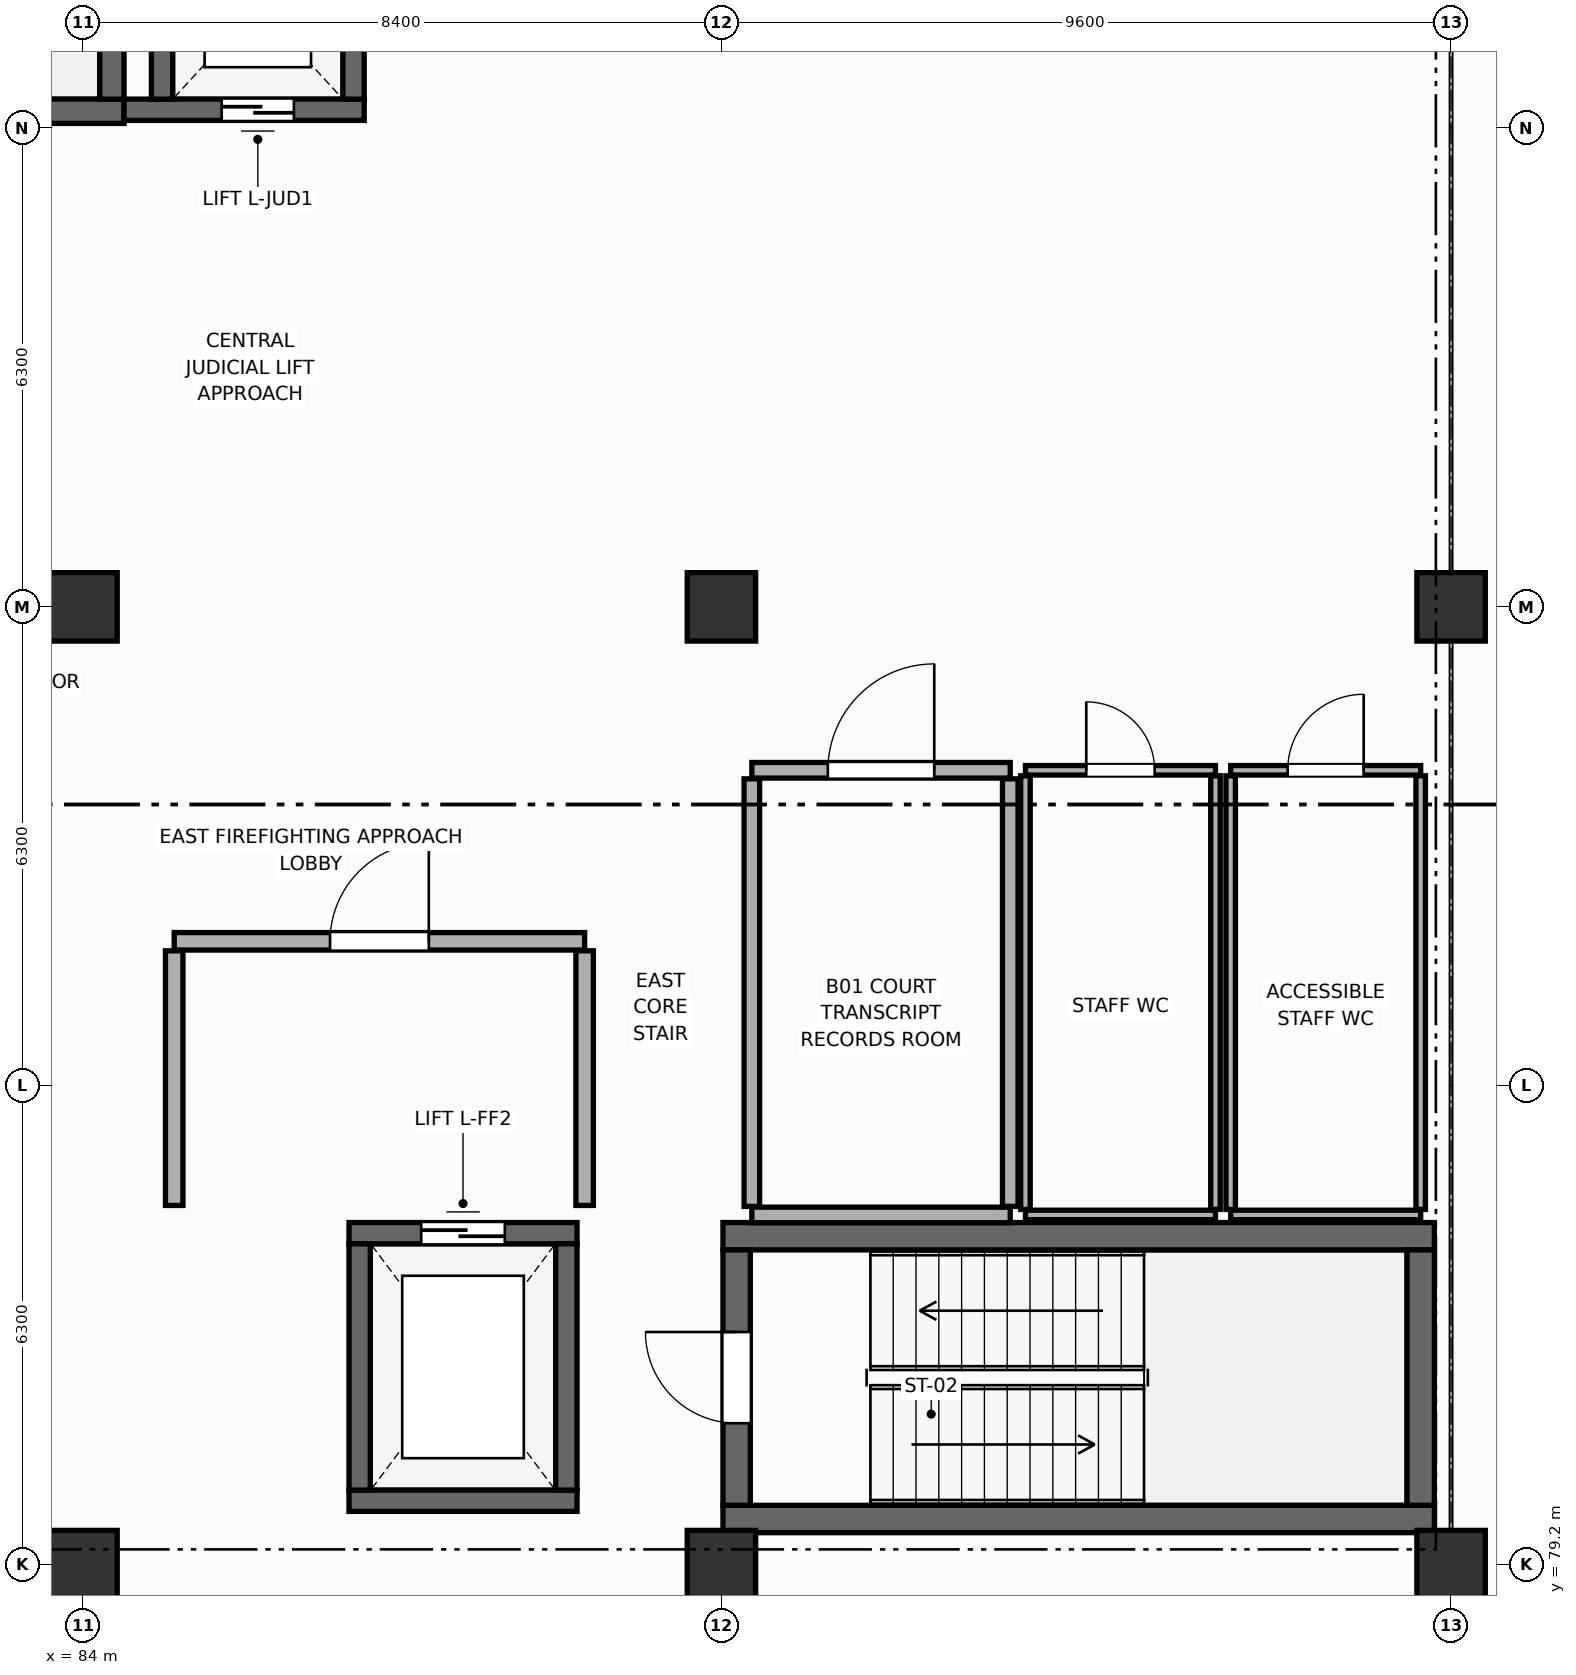
"""IFC4 building model, lengths in metres.
Left out: names, types, materials, properties, quantities, classifications, styles, units other than length and angle.
Written with IfcOpenShell. Run it as: python <this file> out.ifc"""

import sys

from ifc_helpers import new_model, si_unit, direction, frame, frame_2d, origin, origin_2d, place, context, subcontext, project, spatial, rectangle, extrude, element, fill, save


model = new_model("IFC4")
c1 = context("Model", 3, precision=1e-05, world=origin(), true_north=direction((0.0, 1.0)))
c2 = subcontext(c1, "Body", "Model", "MODEL_VIEW")
j1 = project(units=[si_unit("LENGTHUNIT", "METRE"), si_unit("PLANEANGLEUNIT", "RADIAN")], contexts=[c1])
p1 = place(None, origin())
s1 = spatial("IfcSite", under=j1, at=p1, CompositionType="ELEMENT")
p2 = place(p1, origin())
s2 = spatial("IfcBuilding", under=s1, at=p2, CompositionType="ELEMENT")
p3 = place(p2, frame((0.0, 0.0, -4.8)))
s3 = spatial("IfcBuildingStorey", under=s2, at=p3, CompositionType="ELEMENT", Elevation=-4.8)
for number, where, z_axis, x_axis in (
    (1, (84.0, 79.2, -0.42), (0.0, 0.0, 1.0), (1.0, 0.0, 0.0)),
    (2, (84.0, 91.8, -0.42), (0.0, 0.0, 1.0), (1.0, 0.0, 0.0)),
    (3, (92.4, 79.2, -0.42), (0.0, 0.0, 1.0), (1.0, 0.0, 0.0)),
    (4, (92.4, 91.8, -0.42), (0.0, 0.0, 1.0), (1.0, 0.0, 0.0)),
    (5, (102.0, 79.2, -0.42), (0.0, 0.0, 1.0), (1.0, 0.0, 0.0)),
    (6, (102.0, 91.8, -0.42), (0.0, 0.0, 1.0), (1.0, 0.0, 0.0)),
):
    element("IfcColumn", number, at=place(p3, frame(where, z_axis=z_axis, x_axis=x_axis)), inside=s3, PredefinedType="COLUMN", context=c2, shape_type="SweptSolid", body=[
        extrude(rectangle(XDim=0.9, YDim=0.9, at=origin_2d()), origin(), (0.0, 0.0, 1.0), 5.22),
    ])
for number, where, z_axis, x_axis in (
    (7, (92.42, 83.52, -0.42), (0.0, 0.0, 1.0), (1.0, 0.0, 0.0)),
    (8, (101.78, 79.8, -0.42), (0.0, 0.0, 1.0), (-1.0, 0.0, 0.0)),
):
    element("IfcWall", number, at=place(p3, frame(where, z_axis=z_axis, x_axis=x_axis)), inside=s3, PredefinedType="SHEAR", context=c2, shape_type="SweptSolid", body=[
        extrude(rectangle(XDim=9.36, YDim=0.36, at=frame_2d((4.68, 0.0))), origin(), (0.0, 0.0, 1.0), 4.94),
    ])
p4 = place(p3, frame((92.6, 79.98, -0.42), z_axis=(0.0, 0.0, 1.0), x_axis=(0.0, 1.0, 0.0)))
e9 = element("IfcWall", 9, at=p4, inside=s3, PredefinedType="SHEAR", context=c2, shape_type="SweptSolid", body=[
    extrude(rectangle(XDim=3.36, YDim=0.36, at=frame_2d((1.68, 0.0))), origin(), (0.0, 0.0, 1.0), 4.94),
])
p5 = place(p4, frame((1.08, 0.0, 0.42)))
e10 = element("IfcOpeningElement", 10, at=p5, cuts=e9, PredefinedType="OPENING", context=c2, shape_type="SweptSolid", body=[
    extrude(rectangle(XDim=1.2, YDim=2.2, at=frame_2d((0.6, 1.1))), frame((0.0, 0.19, 0.0), z_axis=(0.0, -1.0, 0.0), x_axis=(1.0, 0.0, 0.0)), (0.0, 0.0, 1.0), 0.38),
])
p6 = place(p3, frame((101.6, 83.34, -0.42), z_axis=(0.0, 0.0, 1.0), x_axis=(0.0, -1.0, 0.0)))
e11 = element("IfcWall", 11, at=p6, inside=s3, PredefinedType="SHEAR", context=c2, shape_type="SweptSolid", body=[
    extrude(rectangle(XDim=3.36, YDim=0.36, at=frame_2d((1.68, 0.0))), origin(), (0.0, 0.0, 1.0), 4.94),
])
p7 = place(p3, frame((84.54, 98.32, -0.42), z_axis=(0.0, 0.0, 1.0), x_axis=(-1.0, 0.0, 0.0)))
e12 = element("IfcWall", 12, at=p7, inside=s3, PredefinedType="SHEAR", context=c2, shape_type="SweptSolid", body=[
    extrude(rectangle(XDim=9.08, YDim=0.32, at=frame_2d((4.54, 0.0))), origin(), (0.0, 0.0, 1.0), 4.94),
])
p8 = place(p3, frame((84.38, 101.76, -0.42), z_axis=(0.0, 0.0, 1.0), x_axis=(0.0, -1.0, 0.0)))
e13 = element("IfcWall", 13, at=p8, inside=s3, PredefinedType="SHEAR", context=c2, shape_type="SweptSolid", body=[
    extrude(rectangle(XDim=3.28, YDim=0.32, at=frame_2d((1.64, 0.0))), origin(), (0.0, 0.0, 1.0), 4.94),
])
p9 = place(p3, frame((87.5, 83.56, -0.42), z_axis=(0.0, 0.0, 1.0), x_axis=(1.0, 0.0, 0.0)))
e14 = element("IfcWall", 14, at=p9, inside=s3, PredefinedType="SHEAR", context=c2, shape_type="SweptSolid", body=[
    extrude(rectangle(XDim=3.0, YDim=0.28, at=frame_2d((1.5, 0.0))), origin(), (0.0, 0.0, 1.0), 4.94),
])
p10 = place(p9, frame((0.95, 0.0, 0.42)))
e15 = element("IfcOpeningElement", 15, at=p10, cuts=e14, PredefinedType="OPENING", context=c2, shape_type="SweptSolid", body=[
    extrude(rectangle(XDim=1.1, YDim=2.2, at=frame_2d((0.55, 1.1))), frame((0.0, 0.15, 0.0), z_axis=(0.0, -1.0, 0.0), x_axis=(1.0, 0.0, 0.0)), (0.0, 0.0, 1.0), 0.3),
])
p11 = place(p3, frame((90.5, 80.04, -0.42), z_axis=(0.0, 0.0, 1.0), x_axis=(-1.0, 0.0, 0.0)))
e16 = element("IfcWall", 16, at=p11, inside=s3, PredefinedType="SHEAR", context=c2, shape_type="SweptSolid", body=[
    extrude(rectangle(XDim=3.0, YDim=0.28, at=frame_2d((1.5, 0.0))), origin(), (0.0, 0.0, 1.0), 4.94),
])
for number, where, z_axis, x_axis in (
    (17, (87.64, 80.18, -0.42), (0.0, 0.0, 1.0), (0.0, 1.0, 0.0)),
    (18, (90.36, 83.42, -0.42), (0.0, 0.0, 1.0), (0.0, -1.0, 0.0)),
):
    element("IfcWall", number, at=place(p3, frame(where, z_axis=z_axis, x_axis=x_axis)), inside=s3, PredefinedType="SHEAR", context=c2, shape_type="SweptSolid", body=[
        extrude(rectangle(XDim=3.24, YDim=0.28, at=frame_2d((1.62, 0.0))), origin(), (0.0, 0.0, 1.0), 4.94),
    ])
p12 = place(p3, frame((87.7, 98.34, -0.42), z_axis=(0.0, 0.0, 1.0), x_axis=(-1.0, 0.0, 0.0)))
e19 = element("IfcWall", 19, at=p12, inside=s3, PredefinedType="SHEAR", context=c2, shape_type="SweptSolid", body=[
    extrude(rectangle(XDim=3.16, YDim=0.28, at=frame_2d((1.58, 0.0))), origin(), (0.0, 0.0, 1.0), 4.94),
])
p13 = place(p12, frame((0.925, 0.0, 0.42)))
e20 = element("IfcOpeningElement", 20, at=p13, cuts=e19, PredefinedType="OPENING", context=c2, shape_type="SweptSolid", body=[
    extrude(rectangle(XDim=0.95, YDim=2.15, at=frame_2d((0.475, 1.075))), frame((0.0, 0.15, 0.0), z_axis=(0.0, -1.0, 0.0), x_axis=(1.0, 0.0, 0.0)), (0.0, 0.0, 1.0), 0.3),
])
for number, where, z_axis, x_axis in (
    (21, (85.04, 98.48, -0.42), (0.0, 0.0, 1.0), (0.0, 1.0, 0.0)),
    (22, (87.56, 100.92, -0.42), (0.0, 0.0, 1.0), (0.0, -1.0, 0.0)),
):
    element("IfcWall", number, at=place(p3, frame(where, z_axis=z_axis, x_axis=x_axis)), inside=s3, PredefinedType="SHEAR", context=c2, shape_type="SweptSolid", body=[
        extrude(rectangle(XDim=2.44, YDim=0.28, at=frame_2d((1.22, 0.0))), origin(), (0.0, 0.0, 1.0), 4.94),
    ])
p14 = place(p3, frame((85.2, 87.4, 0.0), z_axis=(0.0, 0.0, 1.0), x_axis=(1.0, 0.0, 0.0)))
e23 = element("IfcWall", 23, at=p14, inside=s3, PredefinedType="STANDARD", context=c2, shape_type="SweptSolid", body=[
    extrude(rectangle(XDim=5.4, YDim=0.23, at=frame_2d((2.7, 0.0))), origin(), (0.0, 0.0, 1.0), 3.9),
])
p15 = place(p14, frame((2.05, 0.0, 0.0)))
e24 = element("IfcOpeningElement", 24, at=p15, cuts=e23, PredefinedType="OPENING", context=c2, shape_type="SweptSolid", body=[
    extrude(rectangle(XDim=1.3, YDim=2.2, at=frame_2d((0.65, 1.1))), frame((0.0, 0.125, 0.0), z_axis=(0.0, -1.0, 0.0), x_axis=(1.0, 0.0, 0.0)), (0.0, 0.0, 1.0), 0.25),
])
for number, where, z_axis, x_axis in (
    (25, (85.2, 83.925, 0.0), (0.0, 0.0, 1.0), (0.0, 1.0, 0.0)),
    (26, (90.6, 87.275, 0.0), (0.0, 0.0, 1.0), (0.0, -1.0, 0.0)),
):
    element("IfcWall", number, at=place(p3, frame(where, z_axis=z_axis, x_axis=x_axis)), inside=s3, PredefinedType="STANDARD", context=c2, shape_type="SweptSolid", body=[
        extrude(rectangle(XDim=3.35, YDim=0.23, at=frame_2d((1.675, 0.0))), origin(), (0.0, 0.0, 1.0), 3.9),
    ])
p16 = place(p3, frame((96.4, 89.65, 0.0), z_axis=(0.0, 0.0, 1.0), x_axis=(1.0, 0.0, 0.0)))
e27 = element("IfcWall", 27, at=p16, inside=s3, PredefinedType="PARTITIONING", context=c2, shape_type="SweptSolid", body=[
    extrude(rectangle(XDim=2.5, YDim=0.125, at=frame_2d((1.25, 0.0))), origin(), (0.0, 0.0, 1.0), 4.505),
])
p17 = place(p16, frame((0.8, 0.0, 0.0)))
e28 = element("IfcOpeningElement", 28, at=p17, cuts=e27, PredefinedType="OPENING", context=c2, shape_type="SweptSolid", body=[
    extrude(rectangle(XDim=0.9, YDim=2.1, at=frame_2d((0.45, 1.05))), frame((0.0, 0.073, 0.0), z_axis=(0.0, -1.0, 0.0), x_axis=(1.0, 0.0, 0.0)), (0.0, 0.0, 1.0), 0.145),
])
p18 = place(p3, frame((98.9, 83.8, 0.0), z_axis=(0.0, 0.0, 1.0), x_axis=(-1.0, 0.0, 0.0)))
e29 = element("IfcWall", 29, at=p18, inside=s3, PredefinedType="PARTITIONING", context=c2, shape_type="SweptSolid", body=[
    extrude(rectangle(XDim=2.5, YDim=0.125, at=frame_2d((1.25, 0.0))), origin(), (0.0, 0.0, 1.0), 4.505),
])
for number, where, z_axis, x_axis in (
    (30, (96.4, 83.873, 0.0), (0.0, 0.0, 1.0), (0.0, 1.0, 0.0)),
    (31, (98.9, 89.577, 0.0), (0.0, 0.0, 1.0), (0.0, -1.0, 0.0)),
):
    element("IfcWall", number, at=place(p3, frame(where, z_axis=z_axis, x_axis=x_axis)), inside=s3, PredefinedType="PARTITIONING", context=c2, shape_type="SweptSolid", body=[
        extrude(rectangle(XDim=5.705, YDim=0.125, at=frame_2d((2.853, 0.0))), origin(), (0.0, 0.0, 1.0), 3.9),
    ])
p19 = place(p3, frame((99.1, 89.65, 0.0), z_axis=(0.0, 0.0, 1.0), x_axis=(1.0, 0.0, 0.0)))
e32 = element("IfcWall", 32, at=p19, inside=s3, PredefinedType="PARTITIONING", context=c2, shape_type="SweptSolid", body=[
    extrude(rectangle(XDim=2.5, YDim=0.125, at=frame_2d((1.25, 0.0))), origin(), (0.0, 0.0, 1.0), 3.65),
])
p20 = place(p19, frame((0.75, 0.0, 0.0)))
e33 = element("IfcOpeningElement", 33, at=p20, cuts=e32, PredefinedType="OPENING", context=c2, shape_type="SweptSolid", body=[
    extrude(rectangle(XDim=1.0, YDim=2.1, at=frame_2d((0.5, 1.05))), frame((0.0, 0.073, 0.0), z_axis=(0.0, -1.0, 0.0), x_axis=(1.0, 0.0, 0.0)), (0.0, 0.0, 1.0), 0.145),
])
p21 = place(p3, frame((101.6, 83.8, 0.0), z_axis=(0.0, 0.0, 1.0), x_axis=(-1.0, 0.0, 0.0)))
e34 = element("IfcWall", 34, at=p21, inside=s3, PredefinedType="PARTITIONING", context=c2, shape_type="SweptSolid", body=[
    extrude(rectangle(XDim=2.5, YDim=0.125, at=frame_2d((1.25, 0.0))), origin(), (0.0, 0.0, 1.0), 3.65),
])
p22 = place(p3, frame((99.1, 83.873, 0.0), z_axis=(0.0, 0.0, 1.0), x_axis=(0.0, 1.0, 0.0)))
e35 = element("IfcWall", 35, at=p22, inside=s3, PredefinedType="PARTITIONING", context=c2, shape_type="SweptSolid", body=[
    extrude(rectangle(XDim=5.705, YDim=0.125, at=frame_2d((2.853, 0.0))), origin(), (0.0, 0.0, 1.0), 3.9),
])
p23 = place(p3, frame((101.6, 89.577, 0.0), z_axis=(0.0, 0.0, 1.0), x_axis=(0.0, -1.0, 0.0)))
e36 = element("IfcWall", 36, at=p23, inside=s3, PredefinedType="PARTITIONING", context=c2, shape_type="SweptSolid", body=[
    extrude(rectangle(XDim=5.705, YDim=0.125, at=frame_2d((2.853, 0.0))), origin(), (0.0, 0.0, 1.0), 3.65),
])
p24 = place(p3, frame((92.8, 89.65, 0.0), z_axis=(0.0, 0.0, 1.0), x_axis=(1.0, 0.0, 0.0)))
e37 = element("IfcWall", 37, at=p24, inside=s3, PredefinedType="STANDARD", context=c2, shape_type="SweptSolid", body=[
    extrude(rectangle(XDim=3.4, YDim=0.205, at=frame_2d((1.7, 0.0))), origin(), (0.0, 0.0, 1.0), 3.65),
])
p25 = place(p24, frame((1.0, 0.0, 0.0)))
e38 = element("IfcOpeningElement", 38, at=p25, cuts=e37, PredefinedType="OPENING", context=c2, shape_type="SweptSolid", body=[
    extrude(rectangle(XDim=1.4, YDim=2.25, at=frame_2d((0.7, 1.125))), frame((0.0, 0.113, 0.0), z_axis=(0.0, -1.0, 0.0), x_axis=(1.0, 0.0, 0.0)), (0.0, 0.0, 1.0), 0.225),
])
p26 = place(p3, frame((96.2, 83.8, 0.0), z_axis=(0.0, 0.0, 1.0), x_axis=(-1.0, 0.0, 0.0)))
e39 = element("IfcWall", 39, at=p26, inside=s3, PredefinedType="STANDARD", context=c2, shape_type="SweptSolid", body=[
    extrude(rectangle(XDim=3.4, YDim=0.205, at=frame_2d((1.7, 0.0))), origin(), (0.0, 0.0, 1.0), 3.65),
])
p27 = place(p3, frame((92.8, 83.913, 0.0), z_axis=(0.0, 0.0, 1.0), x_axis=(0.0, 1.0, 0.0)))
e40 = element("IfcWall", 40, at=p27, inside=s3, PredefinedType="STANDARD", context=c2, shape_type="SweptSolid", body=[
    extrude(rectangle(XDim=5.625, YDim=0.205, at=frame_2d((2.812, 0.0))), origin(), (0.0, 0.0, 1.0), 3.65),
])
p28 = place(p3, frame((96.2, 89.538, 0.0), z_axis=(0.0, 0.0, 1.0), x_axis=(0.0, -1.0, 0.0)))
e41 = element("IfcWall", 41, at=p28, inside=s3, PredefinedType="STANDARD", context=c2, shape_type="SweptSolid", body=[
    extrude(rectangle(XDim=5.625, YDim=0.205, at=frame_2d((2.812, 0.0))), origin(), (0.0, 0.0, 1.0), 3.9),
])
p29 = place(p5, origin())
e42 = element("IfcDoor", 42, at=p29, inside=s3, OperationType="SINGLE_SWING_RIGHT", PredefinedType="DOOR", context=c2, shape_type="SweptSolid", body=[
    extrude(rectangle(XDim=1.2, YDim=2.2, at=frame_2d((0.6, 1.1))), frame((0.0, 0.025, 0.0), z_axis=(0.0, -1.0, 0.0), x_axis=(1.0, 0.0, 0.0)), (0.0, 0.0, 1.0), 0.05),
])
fill(e10, e42)
p30 = place(p10, origin())
e43 = element("IfcDoor", 43, at=p30, inside=s3, OperationType="DOUBLE_DOOR_SLIDING", PredefinedType="DOOR", context=c2, shape_type="SweptSolid", body=[
    extrude(rectangle(XDim=1.1, YDim=2.2, at=frame_2d((0.55, 1.1))), frame((0.0, 0.025, 0.0), z_axis=(0.0, -1.0, 0.0), x_axis=(1.0, 0.0, 0.0)), (0.0, 0.0, 1.0), 0.05),
])
fill(e15, e43)
p31 = place(p13, origin())
e44 = element("IfcDoor", 44, at=p31, inside=s3, OperationType="DOUBLE_DOOR_SLIDING", PredefinedType="DOOR", context=c2, shape_type="SweptSolid", body=[
    extrude(rectangle(XDim=0.95, YDim=2.15, at=frame_2d((0.475, 1.075))), frame((0.0, 0.025, 0.0), z_axis=(0.0, -1.0, 0.0), x_axis=(1.0, 0.0, 0.0)), (0.0, 0.0, 1.0), 0.05),
])
fill(e20, e44)
p32 = place(p15, origin())
e45 = element("IfcDoor", 45, at=p32, inside=s3, OperationType="SINGLE_SWING_RIGHT", PredefinedType="DOOR", context=c2, shape_type="SweptSolid", body=[
    extrude(rectangle(XDim=1.3, YDim=2.2, at=frame_2d((0.65, 1.1))), frame((0.0, 0.025, 0.0), z_axis=(0.0, -1.0, 0.0), x_axis=(1.0, 0.0, 0.0)), (0.0, 0.0, 1.0), 0.05),
])
fill(e24, e45)
p33 = place(p17, origin())
e46 = element("IfcDoor", 46, at=p33, inside=s3, OperationType="SINGLE_SWING_LEFT", PredefinedType="DOOR", context=c2, shape_type="SweptSolid", body=[
    extrude(rectangle(XDim=0.9, YDim=2.1, at=frame_2d((0.45, 1.05))), frame((0.0, 0.025, 0.0), z_axis=(0.0, -1.0, 0.0), x_axis=(1.0, 0.0, 0.0)), (0.0, 0.0, 1.0), 0.05),
])
fill(e28, e46)
p34 = place(p20, origin())
e47 = element("IfcDoor", 47, at=p34, inside=s3, OperationType="SINGLE_SWING_RIGHT", PredefinedType="DOOR", context=c2, shape_type="SweptSolid", body=[
    extrude(rectangle(XDim=1.0, YDim=2.1, at=frame_2d((0.5, 1.05))), frame((0.0, 0.025, 0.0), z_axis=(0.0, -1.0, 0.0), x_axis=(1.0, 0.0, 0.0)), (0.0, 0.0, 1.0), 0.05),
])
fill(e33, e47)
p35 = place(p25, origin())
e48 = element("IfcDoor", 48, at=p35, inside=s3, OperationType="SINGLE_SWING_RIGHT", PredefinedType="DOOR", context=c2, shape_type="SweptSolid", body=[
    extrude(rectangle(XDim=1.4, YDim=2.25, at=frame_2d((0.7, 1.125))), frame((0.0, 0.025, 0.0), z_axis=(0.0, -1.0, 0.0), x_axis=(1.0, 0.0, 0.0)), (0.0, 0.0, 1.0), 0.05),
])
fill(e38, e48)
save(model, sys.argv[1])
